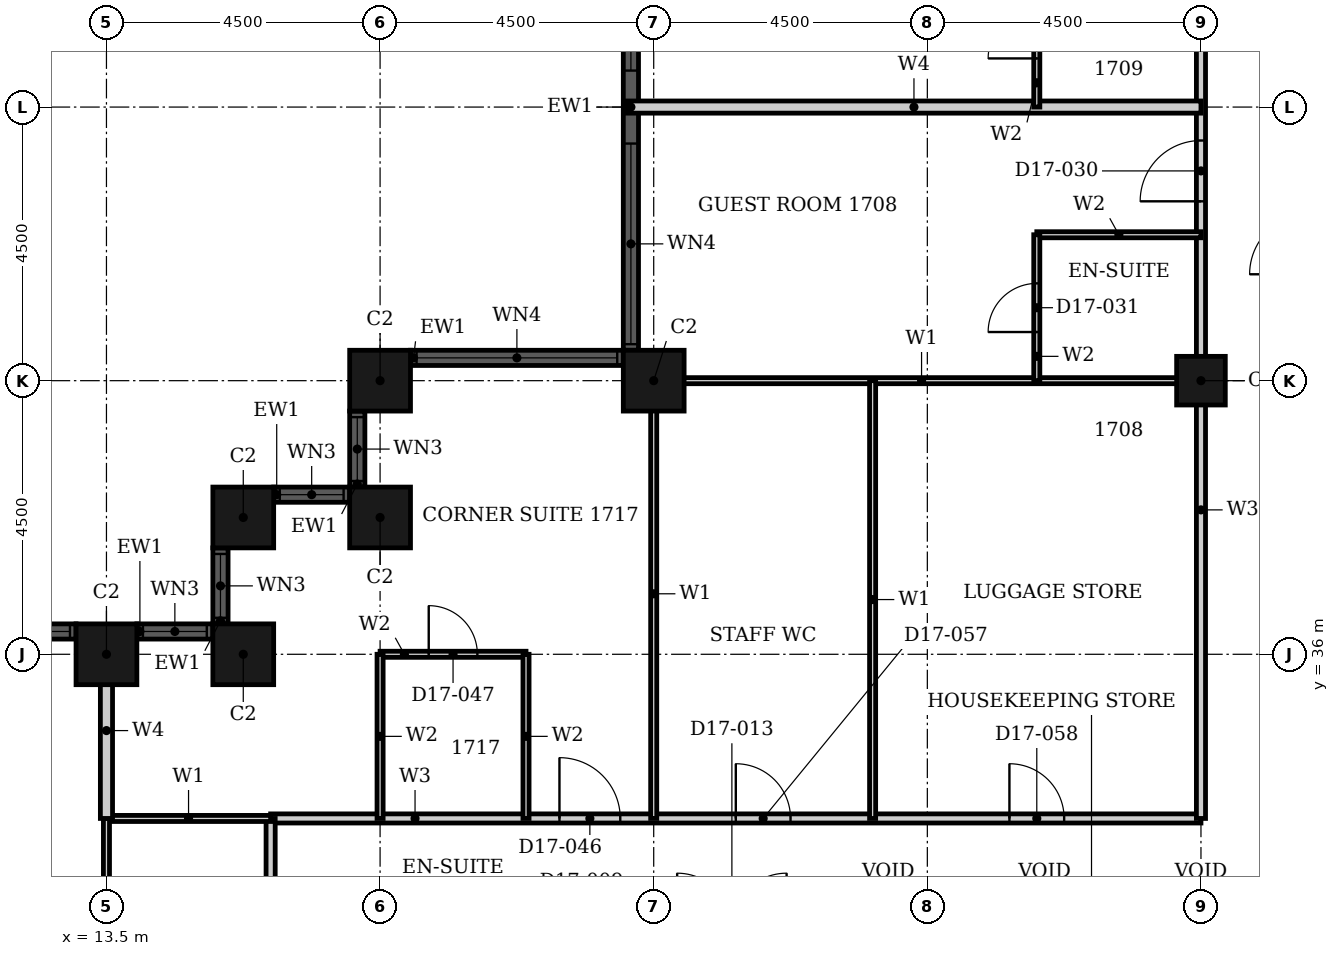
"""IFC4 building model, lengths in metres.
Left out: names, types, materials, properties, quantities, classifications, styles, units other than length and angle.
Written with IfcOpenShell. Run it as: python <this file> out.ifc"""

import sys

from ifc_helpers import new_model, si_unit, direction, frame, frame_2d, origin, origin_2d, place, context, subcontext, project, spatial, rectangle, hollow_rectangle, extrude, element, fill, save


model = new_model("IFC4")
c1 = context("Model", 3, precision=1e-05, world=origin(), true_north=direction((0.0, 1.0)))
c2 = subcontext(c1, "Body", "Model", "MODEL_VIEW")
j1 = project(units=[si_unit("LENGTHUNIT", "METRE"), si_unit("PLANEANGLEUNIT", "RADIAN")], contexts=[c1])
p1 = place(None, origin())
s1 = spatial("IfcSite", under=j1, at=p1, CompositionType="ELEMENT")
p2 = place(p1, origin())
s2 = spatial("IfcBuilding", under=s1, at=p2, CompositionType="ELEMENT")
p3 = place(p2, frame((0.0, 0.0, 74.4)))
s3 = spatial("IfcBuildingStorey", under=s2, at=p3, CompositionType="ELEMENT", Elevation=74.4)
for number, where, z_axis, x_axis in (
    (1, (22.5, 40.5, 0.0), (0.0, 0.0, 1.0), (1.0, 0.0, 0.0)),
    (2, (18.0, 40.5, 0.0), (0.0, 0.0, 1.0), (1.0, 0.0, 0.0)),
    (3, (18.0, 38.25, 0.0), (0.0, 0.0, 1.0), (1.0, 0.0, 0.0)),
    (4, (15.75, 38.25, 0.0), (0.0, 0.0, 1.0), (1.0, 0.0, 0.0)),
    (5, (15.75, 36.0, 0.0), (0.0, 0.0, 1.0), (1.0, 0.0, 0.0)),
    (6, (13.5, 36.0, 0.0), (0.0, 0.0, 1.0), (1.0, 0.0, 0.0)),
):
    element("IfcColumn", number, at=place(p3, frame(where, z_axis=z_axis, x_axis=x_axis)), inside=s3, PredefinedType="COLUMN", context=c2, shape_type="SweptSolid", body=[
        extrude(hollow_rectangle(XDim=1.0, YDim=1.0, WallThickness=0.032, at=origin_2d()), origin(), (0.0, 0.0, 1.0), 3.6),
    ])
p4 = place(p3, frame((31.5, 40.5, 0.0), z_axis=(0.0, 0.0, 1.0), x_axis=(1.0, 0.0, 0.0)))
e7 = element("IfcColumn", 7, at=p4, inside=s3, PredefinedType="COLUMN", context=c2, shape_type="SweptSolid", body=[
    extrude(hollow_rectangle(XDim=0.8, YDim=0.8, WallThickness=0.025, at=origin_2d()), origin(), (0.0, 0.0, 1.0), 3.6),
])
p5 = place(p3, frame((22.125, 49.0, 0.0), z_axis=(0.0, 0.0, 1.0), x_axis=(0.0, -1.0, 0.0)))
e8 = element("IfcWall", 8, at=p5, inside=s3, PredefinedType="SOLIDWALL", context=c2, shape_type="SweptSolid", body=[
    extrude(rectangle(XDim=8.0, YDim=0.25, at=frame_2d((4.0, 0.0))), origin(), (0.0, 0.0, 1.0), 3.6),
])
p6 = place(p5, frame((0.1, 0.0, 0.9)))
e9 = element("IfcOpeningElement", 9, at=p6, cuts=e8, PredefinedType="OPENING", context=c2, shape_type="SweptSolid", body=[
    extrude(rectangle(XDim=3.3, YDim=2.08, at=frame_2d((1.65, 1.04))), frame((0.0, 0.135, 0.0), z_axis=(0.0, -1.0, 0.0), x_axis=(1.0, 0.0, 0.0)), (0.0, 0.0, 1.0), 0.27),
])
p7 = place(p5, frame((4.6, 0.0, 0.9)))
e10 = element("IfcOpeningElement", 10, at=p7, cuts=e8, PredefinedType="OPENING", context=c2, shape_type="SweptSolid", body=[
    extrude(rectangle(XDim=3.3, YDim=2.08, at=frame_2d((1.65, 1.04))), frame((0.0, 0.135, 0.0), z_axis=(0.0, -1.0, 0.0), x_axis=(1.0, 0.0, 0.0)), (0.0, 0.0, 1.0), 0.27),
])
p8 = place(p3, frame((22.0, 40.875, 0.0), z_axis=(0.0, 0.0, 1.0), x_axis=(-1.0, 0.0, 0.0)))
e11 = element("IfcWall", 11, at=p8, inside=s3, PredefinedType="SOLIDWALL", context=c2, shape_type="SweptSolid", body=[
    extrude(rectangle(XDim=3.5, YDim=0.25, at=frame_2d((1.75, 0.0))), origin(), (0.0, 0.0, 1.0), 3.6),
])
p9 = place(p8, frame((0.1, 0.0, 0.9)))
e12 = element("IfcOpeningElement", 12, at=p9, cuts=e11, PredefinedType="OPENING", context=c2, shape_type="SweptSolid", body=[
    extrude(rectangle(XDim=3.3, YDim=2.08, at=frame_2d((1.65, 1.04))), frame((0.0, 0.135, 0.0), z_axis=(0.0, -1.0, 0.0), x_axis=(1.0, 0.0, 0.0)), (0.0, 0.0, 1.0), 0.27),
])
p10 = place(p3, frame((17.625, 40.0, 0.0), z_axis=(0.0, 0.0, 1.0), x_axis=(0.0, -1.0, 0.0)))
e13 = element("IfcWall", 13, at=p10, inside=s3, PredefinedType="SOLIDWALL", context=c2, shape_type="SweptSolid", body=[
    extrude(rectangle(XDim=1.25, YDim=0.25, at=frame_2d((0.625, 0.0))), origin(), (0.0, 0.0, 1.0), 3.6),
])
p11 = place(p10, frame((0.1, 0.0, 0.9)))
e14 = element("IfcOpeningElement", 14, at=p11, cuts=e13, PredefinedType="OPENING", context=c2, shape_type="SweptSolid", body=[
    extrude(rectangle(XDim=1.05, YDim=2.08, at=frame_2d((0.525, 1.04))), frame((0.0, 0.135, 0.0), z_axis=(0.0, -1.0, 0.0), x_axis=(1.0, 0.0, 0.0)), (0.0, 0.0, 1.0), 0.27),
])
p12 = place(p3, frame((17.5, 38.625, 0.0), z_axis=(0.0, 0.0, 1.0), x_axis=(-1.0, 0.0, 0.0)))
e15 = element("IfcWall", 15, at=p12, inside=s3, PredefinedType="SOLIDWALL", context=c2, shape_type="SweptSolid", body=[
    extrude(rectangle(XDim=1.25, YDim=0.25, at=frame_2d((0.625, 0.0))), origin(), (0.0, 0.0, 1.0), 3.6),
])
p13 = place(p12, frame((0.1, 0.0, 0.9)))
e16 = element("IfcOpeningElement", 16, at=p13, cuts=e15, PredefinedType="OPENING", context=c2, shape_type="SweptSolid", body=[
    extrude(rectangle(XDim=1.05, YDim=2.08, at=frame_2d((0.525, 1.04))), frame((0.0, 0.135, 0.0), z_axis=(0.0, -1.0, 0.0), x_axis=(1.0, 0.0, 0.0)), (0.0, 0.0, 1.0), 0.27),
])
p14 = place(p3, frame((15.375, 37.75, 0.0), z_axis=(0.0, 0.0, 1.0), x_axis=(0.0, -1.0, 0.0)))
e17 = element("IfcWall", 17, at=p14, inside=s3, PredefinedType="SOLIDWALL", context=c2, shape_type="SweptSolid", body=[
    extrude(rectangle(XDim=1.25, YDim=0.25, at=frame_2d((0.625, 0.0))), origin(), (0.0, 0.0, 1.0), 3.6),
])
p15 = place(p14, frame((0.1, 0.0, 0.9)))
e18 = element("IfcOpeningElement", 18, at=p15, cuts=e17, PredefinedType="OPENING", context=c2, shape_type="SweptSolid", body=[
    extrude(rectangle(XDim=1.05, YDim=2.08, at=frame_2d((0.525, 1.04))), frame((0.0, 0.135, 0.0), z_axis=(0.0, -1.0, 0.0), x_axis=(1.0, 0.0, 0.0)), (0.0, 0.0, 1.0), 0.27),
])
p16 = place(p3, frame((15.25, 36.375, 0.0), z_axis=(0.0, 0.0, 1.0), x_axis=(-1.0, 0.0, 0.0)))
e19 = element("IfcWall", 19, at=p16, inside=s3, PredefinedType="SOLIDWALL", context=c2, shape_type="SweptSolid", body=[
    extrude(rectangle(XDim=1.25, YDim=0.25, at=frame_2d((0.625, 0.0))), origin(), (0.0, 0.0, 1.0), 3.6),
])
p17 = place(p16, frame((0.1, 0.0, 0.9)))
e20 = element("IfcOpeningElement", 20, at=p17, cuts=e19, PredefinedType="OPENING", context=c2, shape_type="SweptSolid", body=[
    extrude(rectangle(XDim=1.05, YDim=2.08, at=frame_2d((0.525, 1.04))), frame((0.0, 0.135, 0.0), z_axis=(0.0, -1.0, 0.0), x_axis=(1.0, 0.0, 0.0)), (0.0, 0.0, 1.0), 0.27),
])
p18 = place(p3, frame((13.0, 36.375, 0.0), z_axis=(0.0, 0.0, 1.0), x_axis=(-1.0, 0.0, 0.0)))
e21 = element("IfcWall", 21, at=p18, inside=s3, PredefinedType="SOLIDWALL", context=c2, shape_type="SweptSolid", body=[
    extrude(rectangle(XDim=8.0, YDim=0.25, at=frame_2d((4.0, 0.0))), origin(), (0.0, 0.0, 1.0), 3.6),
])
p19 = place(p18, frame((0.1, 0.0, 0.9)))
e22 = element("IfcOpeningElement", 22, at=p19, cuts=e21, PredefinedType="OPENING", context=c2, shape_type="SweptSolid", body=[
    extrude(rectangle(XDim=3.3, YDim=2.08, at=frame_2d((1.65, 1.04))), frame((0.0, 0.135, 0.0), z_axis=(0.0, -1.0, 0.0), x_axis=(1.0, 0.0, 0.0)), (0.0, 0.0, 1.0), 0.27),
])
p20 = place(p18, frame((4.6, 0.0, 0.9)))
e23 = element("IfcOpeningElement", 23, at=p20, cuts=e21, PredefinedType="OPENING", context=c2, shape_type="SweptSolid", body=[
    extrude(rectangle(XDim=3.3, YDim=2.08, at=frame_2d((1.65, 1.04))), frame((0.0, 0.135, 0.0), z_axis=(0.0, -1.0, 0.0), x_axis=(1.0, 0.0, 0.0)), (0.0, 0.0, 1.0), 0.27),
])
p21 = place(p3, frame((16.2, 33.3, 0.0), z_axis=(0.0, 0.0, 1.0), x_axis=(1.0, 0.0, 0.0)))
e24 = element("IfcWall", 24, at=p21, inside=s3, PredefinedType="PARTITIONING", context=c2, shape_type="SweptSolid", body=[
    extrude(rectangle(XDim=15.3, YDim=0.15, at=frame_2d((7.65, 0.0))), origin(), (0.0, 0.0, 1.0), 3.3),
])
p22 = place(p21, frame((4.75, 0.0, 0.0)))
e25 = element("IfcOpeningElement", 25, at=p22, cuts=e24, PredefinedType="OPENING", context=c2, shape_type="SweptSolid", body=[
    extrude(rectangle(XDim=1.0, YDim=2.1, at=frame_2d((0.5, 1.05))), frame((0.0, 0.085, 0.0), z_axis=(0.0, -1.0, 0.0), x_axis=(1.0, 0.0, 0.0)), (0.0, 0.0, 1.0), 0.17),
])
p23 = place(p21, frame((7.65, 0.0, 0.0)))
e26 = element("IfcOpeningElement", 26, at=p23, cuts=e24, PredefinedType="OPENING", context=c2, shape_type="SweptSolid", body=[
    extrude(rectangle(XDim=0.9, YDim=2.1, at=frame_2d((0.45, 1.05))), frame((0.0, 0.085, 0.0), z_axis=(0.0, -1.0, 0.0), x_axis=(1.0, 0.0, 0.0)), (0.0, 0.0, 1.0), 0.17),
])
p24 = place(p21, frame((12.15, 0.0, 0.0)))
e27 = element("IfcOpeningElement", 27, at=p24, cuts=e24, PredefinedType="OPENING", context=c2, shape_type="SweptSolid", body=[
    extrude(rectangle(XDim=0.9, YDim=2.1, at=frame_2d((0.45, 1.05))), frame((0.0, 0.085, 0.0), z_axis=(0.0, -1.0, 0.0), x_axis=(1.0, 0.0, 0.0)), (0.0, 0.0, 1.0), 0.17),
])
p25 = place(p3, frame((16.2, 27.0, 0.0), z_axis=(0.0, 0.0, 1.0), x_axis=(0.0, 1.0, 0.0)))
e28 = element("IfcWall", 28, at=p25, inside=s3, PredefinedType="PARTITIONING", context=c2, shape_type="SweptSolid", body=[
    extrude(rectangle(XDim=6.3, YDim=0.15, at=frame_2d((3.15, 0.0))), origin(), (0.0, 0.0, 1.0), 3.3),
])
p26 = place(p25, frame((2.55, 0.0, 0.0)))
e29 = element("IfcOpeningElement", 29, at=p26, cuts=e28, PredefinedType="OPENING", context=c2, shape_type="SweptSolid", body=[
    extrude(rectangle(XDim=0.9, YDim=2.1, at=frame_2d((0.45, 1.05))), frame((0.0, 0.085, 0.0), z_axis=(0.0, -1.0, 0.0), x_axis=(1.0, 0.0, 0.0)), (0.0, 0.0, 1.0), 0.17),
])
p27 = place(p3, frame((31.5, 33.3, 0.0), z_axis=(0.0, 0.0, 1.0), x_axis=(0.0, 1.0, 0.0)))
e30 = element("IfcWall", 30, at=p27, inside=s3, PredefinedType="PARTITIONING", context=c2, shape_type="SweptSolid", body=[
    extrude(rectangle(XDim=16.2, YDim=0.15, at=frame_2d((8.1, 0.0))), origin(), (0.0, 0.0, 1.0), 2.58),
])
p28 = place(p27, frame((10.15, 0.0, 0.0)))
e31 = element("IfcOpeningElement", 31, at=p28, cuts=e30, PredefinedType="OPENING", context=c2, shape_type="SweptSolid", body=[
    extrude(rectangle(XDim=1.0, YDim=2.1, at=frame_2d((0.5, 1.05))), frame((0.0, 0.085, 0.0), z_axis=(0.0, -1.0, 0.0), x_axis=(1.0, 0.0, 0.0)), (0.0, 0.0, 1.0), 0.17),
])
p29 = place(p27, frame((14.65, 0.0, 0.0)))
e32 = element("IfcOpeningElement", 32, at=p29, cuts=e30, PredefinedType="OPENING", context=c2, shape_type="SweptSolid", body=[
    extrude(rectangle(XDim=1.0, YDim=2.1, at=frame_2d((0.5, 1.05))), frame((0.0, 0.085, 0.0), z_axis=(0.0, -1.0, 0.0), x_axis=(1.0, 0.0, 0.0)), (0.0, 0.0, 1.0), 0.17),
])
p30 = place(p3, frame((13.5, 33.3, 0.0), z_axis=(0.0, 0.0, 1.0), x_axis=(1.0, 0.0, 0.0)))
e33 = element("IfcWall", 33, at=p30, inside=s3, PredefinedType="PARTITIONING", context=c2, shape_type="SweptSolid", body=[
    extrude(rectangle(XDim=2.7, YDim=0.1, at=frame_2d((1.35, 0.0))), origin(), (0.0, 0.0, 1.0), 3.3),
])
p31 = place(p3, frame((22.31, 40.5, 0.0), z_axis=(0.0, 0.0, 1.0), x_axis=(1.0, 0.0, 0.0)))
e34 = element("IfcWall", 34, at=p31, inside=s3, PredefinedType="PARTITIONING", context=c2, shape_type="SweptSolid", body=[
    extrude(rectangle(XDim=9.19, YDim=0.1, at=frame_2d((4.595, 0.0))), origin(), (0.0, 0.0, 1.0), 2.38),
])
p32 = place(p3, frame((13.5, 27.0, 0.0), z_axis=(0.0, 0.0, 1.0), x_axis=(0.0, 1.0, 0.0)))
e35 = element("IfcWall", 35, at=p32, inside=s3, PredefinedType="PARTITIONING", context=c2, shape_type="SweptSolid", body=[
    extrude(rectangle(XDim=6.3, YDim=0.1, at=frame_2d((3.15, 0.0))), origin(), (0.0, 0.0, 1.0), 2.38),
])
p33 = place(p3, frame((22.5, 33.3, 0.0), z_axis=(0.0, 0.0, 1.0), x_axis=(0.0, 1.0, 0.0)))
e36 = element("IfcWall", 36, at=p33, inside=s3, PredefinedType="PARTITIONING", context=c2, shape_type="SweptSolid", body=[
    extrude(rectangle(XDim=7.39, YDim=0.1, at=frame_2d((3.695, 0.0))), origin(), (0.0, 0.0, 1.0), 3.3),
])
p34 = place(p3, frame((26.1, 33.3, 0.0), z_axis=(0.0, 0.0, 1.0), x_axis=(0.0, 1.0, 0.0)))
e37 = element("IfcWall", 37, at=p34, inside=s3, PredefinedType="PARTITIONING", context=c2, shape_type="SweptSolid", body=[
    extrude(rectangle(XDim=7.2, YDim=0.1, at=frame_2d((3.6, 0.0))), origin(), (0.0, 0.0, 1.0), 3.3),
])
p35 = place(p3, frame((22.06, 45.0, 0.0), z_axis=(0.0, 0.0, 1.0), x_axis=(1.0, 0.0, 0.0)))
e38 = element("IfcWall", 38, at=p35, inside=s3, PredefinedType="PARTITIONING", context=c2, shape_type="SweptSolid", body=[
    extrude(rectangle(XDim=9.44, YDim=0.2, at=frame_2d((4.72, 0.0))), origin(), (0.0, 0.0, 1.0), 3.3),
])
p36 = place(p3, frame((13.5, 33.3, 0.0), z_axis=(0.0, 0.0, 1.0), x_axis=(0.0, 1.0, 0.0)))
e39 = element("IfcWall", 39, at=p36, inside=s3, PredefinedType="PARTITIONING", context=c2, shape_type="SweptSolid", body=[
    extrude(rectangle(XDim=2.89, YDim=0.2, at=frame_2d((1.445, 0.0))), origin(), (0.0, 0.0, 1.0), 2.38),
])
p37 = place(p3, frame((18.0, 36.0, 0.0), z_axis=(0.0, 0.0, 1.0), x_axis=(1.0, 0.0, 0.0)))
e40 = element("IfcWall", 40, at=p37, inside=s3, PredefinedType="PARTITIONING", context=c2, shape_type="SweptSolid", body=[
    extrude(rectangle(XDim=2.4, YDim=0.1, at=frame_2d((1.2, 0.0))), origin(), (0.0, 0.0, 1.0), 3.3),
])
p38 = place(p37, frame((0.8, 0.0, 0.0)))
e41 = element("IfcOpeningElement", 41, at=p38, cuts=e40, PredefinedType="OPENING", context=c2, shape_type="SweptSolid", body=[
    extrude(rectangle(XDim=0.8, YDim=2.1, at=frame_2d((0.4, 1.05))), frame((0.0, 0.06, 0.0), z_axis=(0.0, -1.0, 0.0), x_axis=(1.0, 0.0, 0.0)), (0.0, 0.0, 1.0), 0.12),
])
for number, where, z_axis, x_axis in (
    (42, (28.8, 42.9, 0.0), (0.0, 0.0, 1.0), (1.0, 0.0, 0.0)),
    (43, (18.0, 33.3, 0.0), (0.0, 0.0, 1.0), (0.0, 1.0, 0.0)),
    (44, (20.4, 33.3, 0.0), (0.0, 0.0, 1.0), (0.0, 1.0, 0.0)),
):
    element("IfcWall", number, at=place(p3, frame(where, z_axis=z_axis, x_axis=x_axis)), inside=s3, PredefinedType="PARTITIONING", context=c2, shape_type="SweptSolid", body=[
        extrude(rectangle(XDim=2.7, YDim=0.1, at=frame_2d((1.35, 0.0))), origin(), (0.0, 0.0, 1.0), 3.3),
    ])
p39 = place(p3, frame((28.8, 40.5, 0.0), z_axis=(0.0, 0.0, 1.0), x_axis=(0.0, 1.0, 0.0)))
e45 = element("IfcWall", 45, at=p39, inside=s3, PredefinedType="PARTITIONING", context=c2, shape_type="SweptSolid", body=[
    extrude(rectangle(XDim=2.4, YDim=0.1, at=frame_2d((1.2, 0.0))), origin(), (0.0, 0.0, 1.0), 3.3),
])
p40 = place(p39, frame((0.8, 0.0, 0.0)))
e46 = element("IfcOpeningElement", 46, at=p40, cuts=e45, PredefinedType="OPENING", context=c2, shape_type="SweptSolid", body=[
    extrude(rectangle(XDim=0.8, YDim=2.1, at=frame_2d((0.4, 1.05))), frame((0.0, 0.06, 0.0), z_axis=(0.0, -1.0, 0.0), x_axis=(1.0, 0.0, 0.0)), (0.0, 0.0, 1.0), 0.12),
])
p41 = place(p3, frame((28.8, 45.0, 0.0), z_axis=(0.0, 0.0, 1.0), x_axis=(0.0, 1.0, 0.0)))
e47 = element("IfcWall", 47, at=p41, inside=s3, PredefinedType="PARTITIONING", context=c2, shape_type="SweptSolid", body=[
    extrude(rectangle(XDim=2.4, YDim=0.1, at=frame_2d((1.2, 0.0))), origin(), (0.0, 0.0, 1.0), 3.3),
])
p42 = place(p41, frame((0.8, 0.0, 0.0)))
e48 = element("IfcOpeningElement", 48, at=p42, cuts=e47, PredefinedType="OPENING", context=c2, shape_type="SweptSolid", body=[
    extrude(rectangle(XDim=0.8, YDim=2.1, at=frame_2d((0.4, 1.05))), frame((0.0, 0.06, 0.0), z_axis=(0.0, -1.0, 0.0), x_axis=(1.0, 0.0, 0.0)), (0.0, 0.0, 1.0), 0.12),
])
p43 = place(p6, origin())
e49 = element("IfcWindow", 49, at=p43, inside=s3, PartitioningType="SINGLE_PANEL", PredefinedType="WINDOW", context=c2, shape_type="SweptSolid", body=[
    extrude(rectangle(XDim=3.3, YDim=2.08, at=frame_2d((1.65, 1.04))), frame((0.0, 0.03, 0.0), z_axis=(0.0, -1.0, 0.0), x_axis=(1.0, 0.0, 0.0)), (0.0, 0.0, 1.0), 0.06),
])
fill(e9, e49)
p44 = place(p7, origin())
e50 = element("IfcWindow", 50, at=p44, inside=s3, PartitioningType="SINGLE_PANEL", PredefinedType="WINDOW", context=c2, shape_type="SweptSolid", body=[
    extrude(rectangle(XDim=3.3, YDim=2.08, at=frame_2d((1.65, 1.04))), frame((0.0, 0.03, 0.0), z_axis=(0.0, -1.0, 0.0), x_axis=(1.0, 0.0, 0.0)), (0.0, 0.0, 1.0), 0.06),
])
fill(e10, e50)
p45 = place(p9, origin())
e51 = element("IfcWindow", 51, at=p45, inside=s3, PartitioningType="SINGLE_PANEL", PredefinedType="WINDOW", context=c2, shape_type="SweptSolid", body=[
    extrude(rectangle(XDim=3.3, YDim=2.08, at=frame_2d((1.65, 1.04))), frame((0.0, 0.03, 0.0), z_axis=(0.0, -1.0, 0.0), x_axis=(1.0, 0.0, 0.0)), (0.0, 0.0, 1.0), 0.06),
])
fill(e12, e51)
p46 = place(p11, origin())
e52 = element("IfcWindow", 52, at=p46, inside=s3, PartitioningType="SINGLE_PANEL", PredefinedType="WINDOW", context=c2, shape_type="SweptSolid", body=[
    extrude(rectangle(XDim=1.05, YDim=2.08, at=frame_2d((0.525, 1.04))), frame((0.0, 0.03, 0.0), z_axis=(0.0, -1.0, 0.0), x_axis=(1.0, 0.0, 0.0)), (0.0, 0.0, 1.0), 0.06),
])
fill(e14, e52)
p47 = place(p13, origin())
e53 = element("IfcWindow", 53, at=p47, inside=s3, PartitioningType="SINGLE_PANEL", PredefinedType="WINDOW", context=c2, shape_type="SweptSolid", body=[
    extrude(rectangle(XDim=1.05, YDim=2.08, at=frame_2d((0.525, 1.04))), frame((0.0, 0.03, 0.0), z_axis=(0.0, -1.0, 0.0), x_axis=(1.0, 0.0, 0.0)), (0.0, 0.0, 1.0), 0.06),
])
fill(e16, e53)
p48 = place(p15, origin())
e54 = element("IfcWindow", 54, at=p48, inside=s3, PartitioningType="SINGLE_PANEL", PredefinedType="WINDOW", context=c2, shape_type="SweptSolid", body=[
    extrude(rectangle(XDim=1.05, YDim=2.08, at=frame_2d((0.525, 1.04))), frame((0.0, 0.03, 0.0), z_axis=(0.0, -1.0, 0.0), x_axis=(1.0, 0.0, 0.0)), (0.0, 0.0, 1.0), 0.06),
])
fill(e18, e54)
p49 = place(p17, origin())
e55 = element("IfcWindow", 55, at=p49, inside=s3, PartitioningType="SINGLE_PANEL", PredefinedType="WINDOW", context=c2, shape_type="SweptSolid", body=[
    extrude(rectangle(XDim=1.05, YDim=2.08, at=frame_2d((0.525, 1.04))), frame((0.0, 0.03, 0.0), z_axis=(0.0, -1.0, 0.0), x_axis=(1.0, 0.0, 0.0)), (0.0, 0.0, 1.0), 0.06),
])
fill(e20, e55)
p50 = place(p19, origin())
e56 = element("IfcWindow", 56, at=p50, inside=s3, PartitioningType="SINGLE_PANEL", PredefinedType="WINDOW", context=c2, shape_type="SweptSolid", body=[
    extrude(rectangle(XDim=3.3, YDim=2.08, at=frame_2d((1.65, 1.04))), frame((0.0, 0.03, 0.0), z_axis=(0.0, -1.0, 0.0), x_axis=(1.0, 0.0, 0.0)), (0.0, 0.0, 1.0), 0.06),
])
fill(e22, e56)
p51 = place(p28, origin())
e57 = element("IfcDoor", 57, at=p51, inside=s3, OperationType="SINGLE_SWING_RIGHT", PredefinedType="DOOR", context=c2, shape_type="SweptSolid", body=[
    extrude(rectangle(XDim=1.0, YDim=2.1, at=frame_2d((0.5, 1.05))), frame((0.0, 0.025, 0.0), z_axis=(0.0, -1.0, 0.0), x_axis=(1.0, 0.0, 0.0)), (0.0, 0.0, 1.0), 0.05),
])
fill(e31, e57)
p52 = place(p40, origin())
e58 = element("IfcDoor", 58, at=p52, inside=s3, OperationType="SINGLE_SWING_RIGHT", PredefinedType="DOOR", context=c2, shape_type="SweptSolid", body=[
    extrude(rectangle(XDim=0.8, YDim=2.1, at=frame_2d((0.4, 1.05))), frame((0.0, 0.025, 0.0), z_axis=(0.0, -1.0, 0.0), x_axis=(1.0, 0.0, 0.0)), (0.0, 0.0, 1.0), 0.05),
])
fill(e46, e58)
p53 = place(p42, origin())
e59 = element("IfcDoor", 59, at=p53, inside=s3, OperationType="SINGLE_SWING_RIGHT", PredefinedType="DOOR", context=c2, shape_type="SweptSolid", body=[
    extrude(rectangle(XDim=0.8, YDim=2.1, at=frame_2d((0.4, 1.05))), frame((0.0, 0.025, 0.0), z_axis=(0.0, -1.0, 0.0), x_axis=(1.0, 0.0, 0.0)), (0.0, 0.0, 1.0), 0.05),
])
fill(e48, e59)
p54 = place(p22, origin())
e60 = element("IfcDoor", 60, at=p54, inside=s3, OperationType="SINGLE_SWING_RIGHT", PredefinedType="DOOR", context=c2, shape_type="SweptSolid", body=[
    extrude(rectangle(XDim=1.0, YDim=2.1, at=frame_2d((0.5, 1.05))), frame((0.0, 0.025, 0.0), z_axis=(0.0, -1.0, 0.0), x_axis=(1.0, 0.0, 0.0)), (0.0, 0.0, 1.0), 0.05),
])
fill(e25, e60)
p55 = place(p38, origin())
e61 = element("IfcDoor", 61, at=p55, inside=s3, OperationType="SINGLE_SWING_LEFT", PredefinedType="DOOR", context=c2, shape_type="SweptSolid", body=[
    extrude(rectangle(XDim=0.8, YDim=2.1, at=frame_2d((0.4, 1.05))), frame((0.0, 0.025, 0.0), z_axis=(0.0, -1.0, 0.0), x_axis=(1.0, 0.0, 0.0)), (0.0, 0.0, 1.0), 0.05),
])
fill(e41, e61)
p56 = place(p23, origin())
e62 = element("IfcDoor", 62, at=p56, inside=s3, OperationType="SINGLE_SWING_LEFT", PredefinedType="DOOR", context=c2, shape_type="SweptSolid", body=[
    extrude(rectangle(XDim=0.9, YDim=2.1, at=frame_2d((0.45, 1.05))), frame((0.0, 0.025, 0.0), z_axis=(0.0, -1.0, 0.0), x_axis=(1.0, 0.0, 0.0)), (0.0, 0.0, 1.0), 0.05),
])
fill(e26, e62)
p57 = place(p24, origin())
e63 = element("IfcDoor", 63, at=p57, inside=s3, OperationType="SINGLE_SWING_RIGHT", PredefinedType="DOOR", context=c2, shape_type="SweptSolid", body=[
    extrude(rectangle(XDim=0.9, YDim=2.1, at=frame_2d((0.45, 1.05))), frame((0.0, 0.025, 0.0), z_axis=(0.0, -1.0, 0.0), x_axis=(1.0, 0.0, 0.0)), (0.0, 0.0, 1.0), 0.05),
])
fill(e27, e63)
save(model, sys.argv[1])
